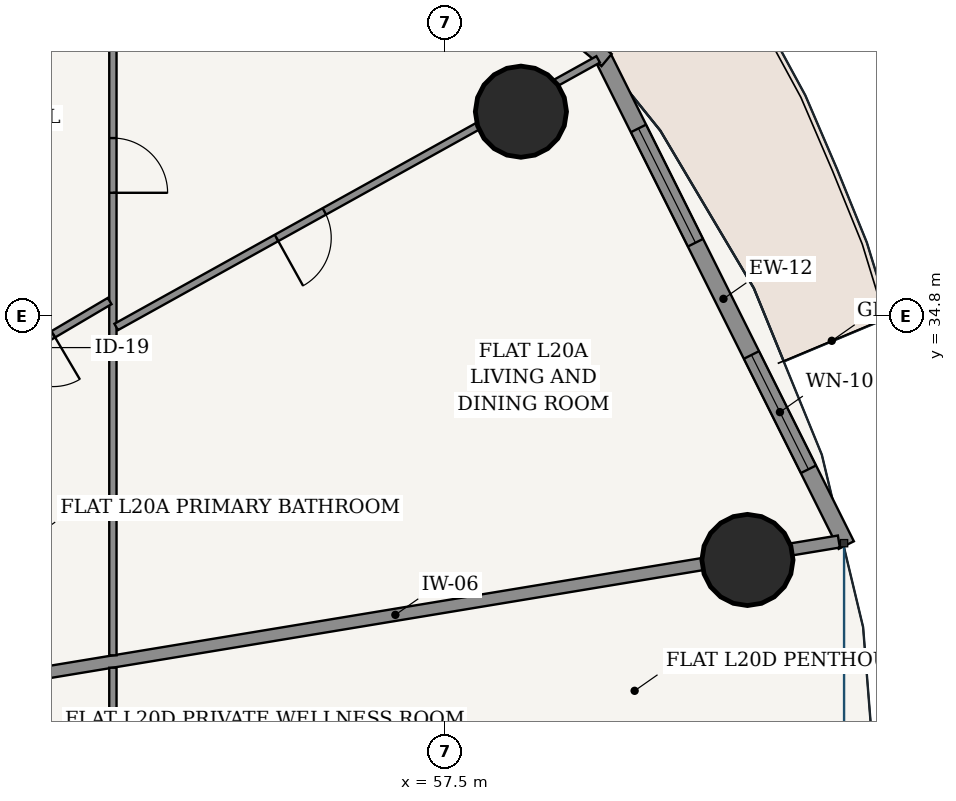
"""IFC4 building model, lengths in metres.
Left out: names, types, materials, properties, quantities, classifications, styles, units other than length and angle.
Written with IfcOpenShell. Run it as: python <this file> out.ifc"""

import sys

from ifc_helpers import new_model, si_unit, direction, frame, frame_2d, origin, origin_2d, place, context, subcontext, project, spatial, rectangle, hollow_circle, extrude, source, transform, mapped, element, fill, save


model = new_model("IFC4")
c1 = context("Model", 3, precision=1e-05, world=origin(), true_north=direction((-0.2419218956, 0.970295726276)))
c2 = subcontext(c1, "Body", "Model", "MODEL_VIEW")
j1 = project(units=[si_unit("LENGTHUNIT", "METRE"), si_unit("PLANEANGLEUNIT", "RADIAN")], contexts=[c1])
p1 = place(None, origin())
s1 = spatial("IfcSite", under=j1, at=p1, CompositionType="ELEMENT")
p2 = place(p1, origin())
s2 = spatial("IfcBuilding", under=s1, at=p2, CompositionType="ELEMENT")
p3 = place(p2, frame((0.0, 0.0, 79.8)))
s3 = spatial("IfcBuildingStorey", under=s2, at=p3, CompositionType="ELEMENT", Elevation=79.8)
for number, where, z_axis, x_axis in (
    (1, (62.471, 30.79, 0.0), (0.0, 0.0, 1.0), (1.0, 0.0, 0.0)),
    (2, (58.745, 38.161, 0.0), (0.0, 0.0, 1.0), (1.0, 0.0, 0.0)),
):
    element("IfcColumn", number, at=place(p3, frame(where, z_axis=z_axis, x_axis=x_axis)), inside=s3, PredefinedType="COLUMN", context=c2, shape_type="SweptSolid", body=[
        extrude(hollow_circle(Radius=0.75, WallThickness=0.045, at=origin_2d()), origin(), (0.0, 0.0, 1.0), 3.6),
    ])
p4 = place(p3, frame((64.095, 31.034, 0.0), z_axis=(0.0, 0.0, 1.0), x_axis=(-0.446263788661, 0.894901464369, 0.0)))
e3 = element("IfcWall", 3, at=p4, inside=s3, PredefinedType="SOLIDWALL", context=c2, shape_type="SweptSolid", body=[
    extrude(rectangle(XDim=9.05, YDim=0.28, at=frame_2d((4.525, 0.0))), origin(), (0.0, 0.0, 1.0), 3.325),
])
p5 = place(p4, frame((1.394, 0.0, 0.85)))
e4 = element("IfcOpeningElement", 4, at=p5, cuts=e3, PredefinedType="OPENING", context=c2, shape_type="SweptSolid", body=[
    extrude(rectangle(XDim=2.1, YDim=1.95, at=frame_2d((1.05, 0.975))), frame((0.0, 0.15, 0.0), z_axis=(0.0, -1.0, 0.0), x_axis=(1.0, 0.0, 0.0)), (0.0, 0.0, 1.0), 0.3),
])
p6 = place(p4, frame((5.557, 0.0, 0.85)))
e5 = element("IfcOpeningElement", 5, at=p6, cuts=e3, PredefinedType="OPENING", context=c2, shape_type="SweptSolid", body=[
    extrude(rectangle(XDim=2.1, YDim=1.95, at=frame_2d((1.05, 0.975))), frame((0.0, 0.15, 0.0), z_axis=(0.0, -1.0, 0.0), x_axis=(1.0, 0.0, 0.0)), (0.0, 0.0, 1.0), 0.3),
])
p7 = place(p3, frame((60.154, 39.01, 0.0), z_axis=(0.0, 0.0, 1.0), x_axis=(-0.769242574941, 0.638956853706, 0.0)))
e6 = element("IfcWall", 6, at=p7, inside=s3, PredefinedType="SOLIDWALL", context=c2, shape_type="SweptSolid", body=[
    extrude(rectangle(XDim=9.69, YDim=0.26, at=frame_2d((4.845, 0.0))), origin(), (0.0, 0.0, 1.0), 3.325),
])
p8 = place(p7, frame((4.17, 0.0, 0.0)))
e7 = element("IfcOpeningElement", 7, at=p8, cuts=e6, PredefinedType="OPENING", context=c2, shape_type="SweptSolid", body=[
    extrude(rectangle(XDim=1.35, YDim=2.2, at=frame_2d((0.675, 1.1))), frame((0.0, 0.14, 0.0), z_axis=(0.0, -1.0, 0.0), x_axis=(1.0, 0.0, 0.0)), (0.0, 0.0, 1.0), 0.28),
])
p9 = place(p3, frame((49.387, 28.682, 0.0), z_axis=(0.0, 0.0, 1.0), x_axis=(0.986617934215, 0.163049231479, 0.0)))
e8 = element("IfcWall", 8, at=p9, inside=s3, PredefinedType="PARTITIONING", context=c2, shape_type="SweptSolid", body=[
    extrude(rectangle(XDim=14.785, YDim=0.2, at=frame_2d((7.392, 0.0))), origin(), (0.0, 0.0, 1.0), 2.767),
])
p10 = place(p3, frame((52.035, 39.835, 0.0), z_axis=(0.0, 0.0, 1.0), x_axis=(0.0, -1.0, 0.0)))
e9 = element("IfcWall", 9, at=p10, inside=s3, PredefinedType="PARTITIONING", context=c2, shape_type="SweptSolid", body=[
    extrude(rectangle(XDim=10.614, YDim=0.12, at=frame_2d((5.307, 0.0))), origin(), (0.0, 0.0, 1.0), 2.767),
])
p11 = place(p10, frame((2.107, 0.0, 0.0)))
e10 = element("IfcOpeningElement", 10, at=p11, cuts=e9, PredefinedType="OPENING", context=c2, shape_type="SweptSolid", body=[
    extrude(rectangle(XDim=0.9, YDim=2.15, at=frame_2d((0.45, 1.075))), frame((0.0, 0.07, 0.0), z_axis=(0.0, -1.0, 0.0), x_axis=(1.0, 0.0, 0.0)), (0.0, 0.0, 1.0), 0.14),
])
p12 = place(p3, frame((52.089, 34.622, 0.0), z_axis=(0.0, 0.0, 1.0), x_axis=(0.874324904351, 0.485341077626, 0.0)))
e11 = element("IfcWall", 11, at=p12, inside=s3, PredefinedType="PARTITIONING", context=c2, shape_type="SweptSolid", body=[
    extrude(rectangle(XDim=9.066, YDim=0.12, at=frame_2d((4.533, 0.0))), origin(), (0.0, 0.0, 1.0), 2.767),
])
p13 = place(p12, frame((3.016, 0.0, 0.0)))
e12 = element("IfcOpeningElement", 12, at=p13, cuts=e11, PredefinedType="OPENING", context=c2, shape_type="SweptSolid", body=[
    extrude(rectangle(XDim=0.9, YDim=2.15, at=frame_2d((0.45, 1.075))), frame((0.0, 0.07, 0.0), z_axis=(0.0, -1.0, 0.0), x_axis=(1.0, 0.0, 0.0)), (0.0, 0.0, 1.0), 0.14),
])
p14 = place(p3, frame((49.387, 33.517, 0.0), z_axis=(0.0, 0.0, 1.0), x_axis=(0.861344081849, 0.508022019862, 0.0)))
e13 = element("IfcWall", 13, at=p14, inside=s3, PredefinedType="PARTITIONING", context=c2, shape_type="SweptSolid", body=[
    extrude(rectangle(XDim=3.013, YDim=0.12, at=frame_2d((1.506, 0.0))), origin(), (0.0, 0.0, 1.0), 3.325),
])
p15 = place(p14, frame((1.076, 0.0, 0.0)))
e14 = element("IfcOpeningElement", 14, at=p15, cuts=e13, PredefinedType="OPENING", context=c2, shape_type="SweptSolid", body=[
    extrude(rectangle(XDim=0.86, YDim=2.15, at=frame_2d((0.43, 1.075))), frame((0.0, 0.07, 0.0), z_axis=(0.0, -1.0, 0.0), x_axis=(1.0, 0.0, 0.0)), (0.0, 0.0, 1.0), 0.14),
])
p16 = place(p3, frame((52.035, 29.017, 0.0), z_axis=(0.0, 0.0, 1.0), x_axis=(0.0, -1.0, 0.0)))
e15 = element("IfcWall", 15, at=p16, inside=s3, PredefinedType="PARTITIONING", context=c2, shape_type="SweptSolid", body=[
    extrude(rectangle(XDim=15.252, YDim=0.12, at=frame_2d((7.626, 0.0))), origin(), (0.0, 0.0, 1.0), 2.767),
])
p17 = place(p16, frame((7.278, 0.0, 0.0)))
e16 = element("IfcOpeningElement", 16, at=p17, cuts=e15, PredefinedType="OPENING", context=c2, shape_type="SweptSolid", body=[
    extrude(rectangle(XDim=0.9, YDim=2.15, at=frame_2d((0.45, 1.075))), frame((0.0, 0.07, 0.0), z_axis=(0.0, -1.0, 0.0), x_axis=(1.0, 0.0, 0.0)), (0.0, 0.0, 1.0), 0.14),
])
m1 = source(origin(), c2, "Body", "SweptSolid", [
    extrude(rectangle(XDim=2.1, YDim=1.95, at=frame_2d((1.05, 0.975))), frame((0.0, 0.03, 0.0), z_axis=(0.0, -1.0, 0.0), x_axis=(1.0, 0.0, 0.0)), (0.0, 0.0, 1.0), 0.06),
])
p18 = place(p5, origin())
e17 = element("IfcWindow", 17, at=p18, inside=s3, PartitioningType="SINGLE_PANEL", PredefinedType="WINDOW", context=c2, shape_type="MappedRepresentation", body=[
    mapped(m1, transform((0.0, 0.0, 0.0), scale=1.0)),
])
fill(e4, e17)
p19 = place(p6, origin())
e18 = element("IfcWindow", 18, at=p19, inside=s3, PartitioningType="SINGLE_PANEL", PredefinedType="WINDOW", context=c2, shape_type="MappedRepresentation", body=[
    mapped(m1, transform((0.0, 0.0, 0.0), scale=1.0)),
])
fill(e5, e18)
m2 = source(origin(), c2, "Body", "SweptSolid", [
    extrude(rectangle(XDim=0.86, YDim=2.15, at=frame_2d((0.43, 1.075))), frame((0.0, 0.025, 0.0), z_axis=(0.0, -1.0, 0.0), x_axis=(1.0, 0.0, 0.0)), (0.0, 0.0, 1.0), 0.05),
])
p20 = place(p15, frame((0.86, 0.0, 0.0), z_axis=(0.0, 0.0, 1.0), x_axis=(-1.0, 0.0, 0.0)))
e19 = element("IfcDoor", 19, at=p20, inside=s3, OperationType="SINGLE_SWING_LEFT", PredefinedType="DOOR", context=c2, shape_type="MappedRepresentation", body=[
    mapped(m2, transform((0.0, 0.0, 0.0), scale=1.0)),
])
fill(e14, e19)
m3 = source(origin(), c2, "Body", "SweptSolid", [
    extrude(rectangle(XDim=0.9, YDim=2.15, at=frame_2d((0.45, 1.075))), frame((0.0, 0.025, 0.0), z_axis=(0.0, -1.0, 0.0), x_axis=(1.0, 0.0, 0.0)), (0.0, 0.0, 1.0), 0.05),
])
p21 = place(p11, origin())
e20 = element("IfcDoor", 20, at=p21, inside=s3, OperationType="SINGLE_SWING_RIGHT", PredefinedType="DOOR", context=c2, shape_type="MappedRepresentation", body=[
    mapped(m3, transform((0.0, 0.0, 0.0), scale=1.0)),
])
fill(e10, e20)
p22 = place(p13, frame((0.9, 0.0, 0.0), z_axis=(0.0, 0.0, 1.0), x_axis=(-1.0, 0.0, 0.0)))
e21 = element("IfcDoor", 21, at=p22, inside=s3, OperationType="SINGLE_SWING_RIGHT", PredefinedType="DOOR", context=c2, shape_type="MappedRepresentation", body=[
    mapped(m3, transform((0.0, 0.0, 0.0), scale=1.0)),
])
fill(e12, e21)
save(model, sys.argv[1])
